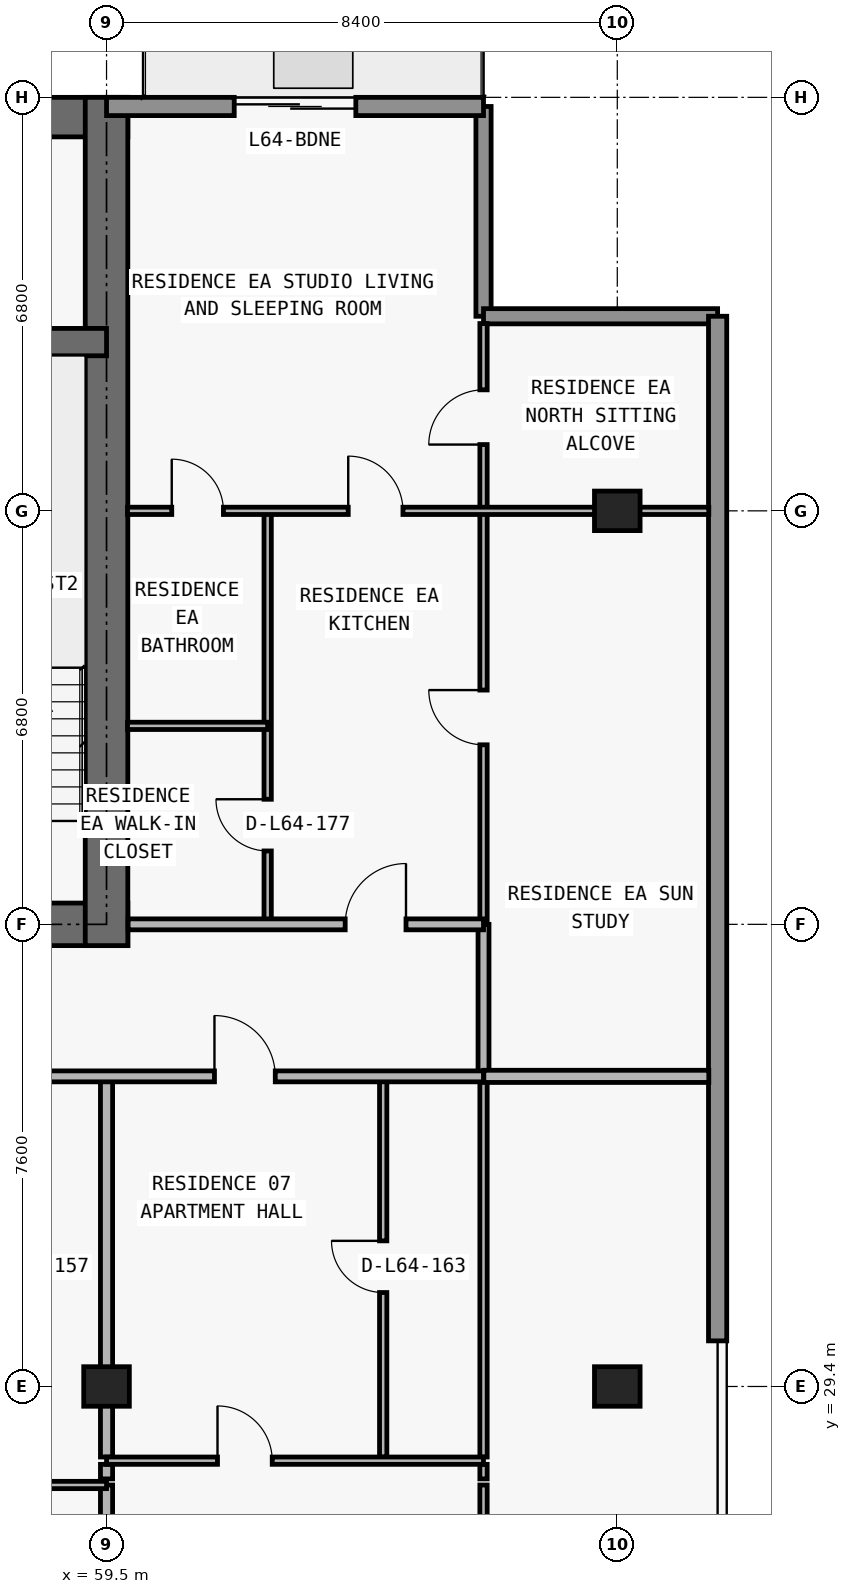
"""IFC4 building model, lengths in metres.
Left out: names, types, materials, properties, quantities, classifications, styles, units other than length and angle.
Written with IfcOpenShell. Run it as: python <this file> out.ifc"""

import sys

from ifc_helpers import new_model, si_unit, direction, frame, frame_2d, origin, origin_2d, place, context, subcontext, project, spatial, rectangle, extrude, element, fill, save


model = new_model("IFC4")
c1 = context("Model", 3, precision=1e-05, world=origin(), true_north=direction((0.0, 1.0)))
c2 = subcontext(c1, "Body", "Model", "MODEL_VIEW")
j1 = project(units=[si_unit("LENGTHUNIT", "METRE"), si_unit("PLANEANGLEUNIT", "RADIAN")], contexts=[c1])
p1 = place(None, origin())
s1 = spatial("IfcSite", under=j1, at=p1, CompositionType="ELEMENT")
p2 = place(p1, origin())
s2 = spatial("IfcBuilding", under=s1, at=p2, CompositionType="ELEMENT")
p3 = place(p2, frame((0.0, 0.0, 229.8)))
s3 = spatial("IfcBuildingStorey", under=s2, at=p3, CompositionType="ELEMENT", Elevation=229.8)
for number, where, z_axis, x_axis in (
    (1, (59.5, 29.4, 0.0), (0.0, 0.0, 1.0), (1.0, 0.0, 0.0)),
    (2, (67.9, 29.4, 0.0), (0.0, 0.0, 1.0), (1.0, 0.0, 0.0)),
    (3, (67.9, 43.8, 0.0), (0.0, 0.0, 1.0), (1.0, 0.0, 0.0)),
):
    element("IfcColumn", number, at=place(p3, frame(where, z_axis=z_axis, x_axis=x_axis)), inside=s3, PredefinedType="COLUMN", context=c2, shape_type="SweptSolid", body=[
        extrude(rectangle(XDim=0.75, YDim=0.65, at=origin_2d()), origin(), (0.0, 0.0, 1.0), 3.05),
    ])
p4 = place(p3, frame((17.95, 37.0, 0.0), z_axis=(0.0, 0.0, 1.0), x_axis=(1.0, 0.0, 0.0)))
e4 = element("IfcWall", 4, at=p4, inside=s3, PredefinedType="SHEAR", context=c2, shape_type="SweptSolid", body=[
    extrude(rectangle(XDim=41.9, YDim=0.7, at=frame_2d((20.95, 0.0))), origin(), (0.0, 0.0, 1.0), 3.05),
])
p5 = place(p4, frame((14.35, 0.0, 0.0)))
e5 = element("IfcOpeningElement", 5, at=p5, cuts=e4, PredefinedType="OPENING", context=c2, shape_type="SweptSolid", body=[
    extrude(rectangle(XDim=1.1, YDim=2.15, at=frame_2d((0.55, 1.075))), frame((0.0, 0.36, 0.0), z_axis=(0.0, -1.0, 0.0), x_axis=(1.0, 0.0, 0.0)), (0.0, 0.0, 1.0), 0.72),
])
p6 = place(p4, frame((6.2, 0.0, 0.0)))
e6 = element("IfcOpeningElement", 6, at=p6, cuts=e4, PredefinedType="OPENING", context=c2, shape_type="SweptSolid", body=[
    extrude(rectangle(XDim=1.05, YDim=2.15, at=frame_2d((0.525, 1.075))), frame((0.0, 0.36, 0.0), z_axis=(0.0, -1.0, 0.0), x_axis=(1.0, 0.0, 0.0)), (0.0, 0.0, 1.0), 0.72),
])
p7 = place(p4, frame((34.7, 0.0, 0.0)))
e7 = element("IfcOpeningElement", 7, at=p7, cuts=e4, PredefinedType="OPENING", context=c2, shape_type="SweptSolid", body=[
    extrude(rectangle(XDim=1.05, YDim=2.15, at=frame_2d((0.525, 1.075))), frame((0.0, 0.36, 0.0), z_axis=(0.0, -1.0, 0.0), x_axis=(1.0, 0.0, 0.0)), (0.0, 0.0, 1.0), 0.72),
])
p8 = place(p4, frame((10.812, 0.0, 0.0)))
e8 = element("IfcOpeningElement", 8, at=p8, cuts=e4, PredefinedType="OPENING", context=c2, shape_type="SweptSolid", body=[
    extrude(rectangle(XDim=1.05, YDim=2.15, at=frame_2d((0.525, 1.075))), frame((0.0, 0.36, 0.0), z_axis=(0.0, -1.0, 0.0), x_axis=(1.0, 0.0, 0.0)), (0.0, 0.0, 1.0), 0.72),
])
p9 = place(p4, frame((24.05, 0.0, 0.0)))
e9 = element("IfcOpeningElement", 9, at=p9, cuts=e4, PredefinedType="OPENING", context=c2, shape_type="SweptSolid", body=[
    extrude(rectangle(XDim=1.05, YDim=2.15, at=frame_2d((0.525, 1.075))), frame((0.0, 0.36, 0.0), z_axis=(0.0, -1.0, 0.0), x_axis=(1.0, 0.0, 0.0)), (0.0, 0.0, 1.0), 0.72),
])
p10 = place(p3, frame((17.95, 50.275, 0.0), z_axis=(0.0, 0.0, 1.0), x_axis=(1.0, 0.0, 0.0)))
e10 = element("IfcWall", 10, at=p10, inside=s3, PredefinedType="SHEAR", context=c2, shape_type="SweptSolid", body=[
    extrude(rectangle(XDim=41.9, YDim=0.65, at=frame_2d((20.95, 0.0))), origin(), (0.0, 0.0, 1.0), 3.05),
])
p11 = place(p3, frame((59.5, 36.65, 0.0), z_axis=(0.0, 0.0, 1.0), x_axis=(0.0, 1.0, 0.0)))
e11 = element("IfcWall", 11, at=p11, inside=s3, PredefinedType="SHEAR", context=c2, shape_type="SweptSolid", body=[
    extrude(rectangle(XDim=13.95, YDim=0.7, at=frame_2d((6.975, 0.0))), origin(), (0.0, 0.0, 1.0), 3.05),
])
p12 = place(p3, frame((18.3, 46.575, 0.0), z_axis=(0.0, 0.0, 1.0), x_axis=(1.0, 0.0, 0.0)))
e12 = element("IfcWall", 12, at=p12, inside=s3, PredefinedType="SHEAR", context=c2, shape_type="SweptSolid", body=[
    extrude(rectangle(XDim=41.2, YDim=0.45, at=frame_2d((20.6, 0.0))), origin(), (0.0, 0.0, 1.0), 3.05),
])
p13 = place(p12, frame((7.575, 0.0, 0.0)))
e13 = element("IfcOpeningElement", 13, at=p13, cuts=e12, PredefinedType="OPENING", context=c2, shape_type="SweptSolid", body=[
    extrude(rectangle(XDim=1.05, YDim=2.15, at=frame_2d((0.525, 1.075))), frame((0.0, 0.235, 0.0), z_axis=(0.0, -1.0, 0.0), x_axis=(1.0, 0.0, 0.0)), (0.0, 0.0, 1.0), 0.47),
])
p14 = place(p12, frame((32.625, 0.0, 0.0)))
e14 = element("IfcOpeningElement", 14, at=p14, cuts=e12, PredefinedType="OPENING", context=c2, shape_type="SweptSolid", body=[
    extrude(rectangle(XDim=1.05, YDim=2.15, at=frame_2d((0.525, 1.075))), frame((0.0, 0.235, 0.0), z_axis=(0.0, -1.0, 0.0), x_axis=(1.0, 0.0, 0.0)), (0.0, 0.0, 1.0), 0.47),
])
p15 = place(p3, frame((65.7, 50.45, 0.0), z_axis=(0.0, 0.0, 1.0), x_axis=(0.0, -1.0, 0.0)))
e15 = element("IfcWall", 15, at=p15, inside=s3, PredefinedType="ELEMENTEDWALL", context=c2, shape_type="SweptSolid", body=[
    extrude(rectangle(XDim=3.45, YDim=0.25, at=frame_2d((1.725, 0.0))), origin(), (0.0, 0.0, 1.0), 3.05),
])
p16 = place(p3, frame((65.7, 47.0, 0.0), z_axis=(0.0, 0.0, 1.0), x_axis=(1.0, 0.0, 0.0)))
e16 = element("IfcWall", 16, at=p16, inside=s3, PredefinedType="ELEMENTEDWALL", context=c2, shape_type="SweptSolid", body=[
    extrude(rectangle(XDim=3.85, YDim=0.25, at=frame_2d((1.925, 0.0))), origin(), (0.0, 0.0, 1.0), 3.05),
])
p17 = place(p3, frame((69.55, 47.0, 0.0), z_axis=(0.0, 0.0, 1.0), x_axis=(0.0, -1.0, 0.0)))
e17 = element("IfcWall", 17, at=p17, inside=s3, PredefinedType="STANDARD", context=c2, shape_type="SweptSolid", body=[
    extrude(rectangle(XDim=16.85, YDim=0.3, at=frame_2d((8.425, 0.0))), origin(), (0.0, 0.0, 1.0), 3.05),
])
p18 = place(p3, frame((59.5, 50.45, 0.0), z_axis=(0.0, 0.0, 1.0), x_axis=(1.0, 0.0, 0.0)))
e18 = element("IfcWall", 18, at=p18, inside=s3, PredefinedType="STANDARD", context=c2, shape_type="SweptSolid", body=[
    extrude(rectangle(XDim=6.2, YDim=0.3, at=frame_2d((3.1, 0.0))), origin(), (0.0, 0.0, 1.0), 3.05),
])
p19 = place(p18, frame((2.1, 0.0, 0.0)))
e19 = element("IfcOpeningElement", 19, at=p19, cuts=e18, PredefinedType="OPENING", context=c2, shape_type="SweptSolid", body=[
    extrude(rectangle(XDim=2.0, YDim=2.3, at=frame_2d((1.0, 1.15))), frame((0.0, 0.16, 0.0), z_axis=(0.0, -1.0, 0.0), x_axis=(1.0, 0.0, 0.0)), (0.0, 0.0, 1.0), 0.32),
])
p20 = place(p3, frame((59.5, 23.09, 0.0), z_axis=(0.0, 0.0, 1.0), x_axis=(0.0, 1.0, 0.0)))
e20 = element("IfcWall", 20, at=p20, inside=s3, PredefinedType="PARTITIONING", context=c2, shape_type="SweptSolid", body=[
    extrude(rectangle(XDim=4.69, YDim=0.2, at=frame_2d((2.345, 0.0))), origin(), (0.0, 0.0, 1.0), 2.263),
])
p21 = place(p3, frame((59.5, 27.88, 0.0), z_axis=(0.0, 0.0, 1.0), x_axis=(0.0, 1.0, 0.0)))
e21 = element("IfcWall", 21, at=p21, inside=s3, PredefinedType="PARTITIONING", context=c2, shape_type="SweptSolid", body=[
    extrude(rectangle(XDim=0.24, YDim=0.2, at=frame_2d((0.12, 0.0))), origin(), (0.0, 0.0, 1.0), 2.263),
])
p22 = place(p3, frame((59.5, 28.24, 0.0), z_axis=(0.0, 0.0, 1.0), x_axis=(0.0, 1.0, 0.0)))
e22 = element("IfcWall", 22, at=p22, inside=s3, PredefinedType="PARTITIONING", context=c2, shape_type="SweptSolid", body=[
    extrude(rectangle(XDim=6.26, YDim=0.2, at=frame_2d((3.13, 0.0))), origin(), (0.0, 0.0, 1.0), 2.263),
])
p23 = place(p3, frame((62.15, 37.0, 0.0), z_axis=(0.0, 0.0, 1.0), x_axis=(0.0, 1.0, 0.0)))
e23 = element("IfcWall", 23, at=p23, inside=s3, PredefinedType="PARTITIONING", context=c2, shape_type="SweptSolid", body=[
    extrude(rectangle(XDim=6.8, YDim=0.12, at=frame_2d((3.4, 0.0))), origin(), (0.0, 0.0, 1.0), 2.679),
])
p24 = place(p23, frame((1.207, 0.0, 0.0)))
e24 = element("IfcOpeningElement", 24, at=p24, cuts=e23, PredefinedType="OPENING", context=c2, shape_type="SweptSolid", body=[
    extrude(rectangle(XDim=0.85, YDim=2.1, at=frame_2d((0.425, 1.05))), frame((0.0, 0.07, 0.0), z_axis=(0.0, -1.0, 0.0), x_axis=(1.0, 0.0, 0.0)), (0.0, 0.0, 1.0), 0.14),
])
p25 = place(p3, frame((64.05, 28.24, 0.0), z_axis=(0.0, 0.0, 1.0), x_axis=(0.0, 1.0, 0.0)))
e25 = element("IfcWall", 25, at=p25, inside=s3, PredefinedType="PARTITIONING", context=c2, shape_type="SweptSolid", body=[
    extrude(rectangle(XDim=6.26, YDim=0.12, at=frame_2d((3.13, 0.0))), origin(), (0.0, 0.0, 1.0), 3.05),
])
p26 = place(p25, frame((2.705, 0.0, 0.0)))
e26 = element("IfcOpeningElement", 26, at=p26, cuts=e25, PredefinedType="OPENING", context=c2, shape_type="SweptSolid", body=[
    extrude(rectangle(XDim=0.85, YDim=2.1, at=frame_2d((0.425, 1.05))), frame((0.0, 0.07, 0.0), z_axis=(0.0, -1.0, 0.0), x_axis=(1.0, 0.0, 0.0)), (0.0, 0.0, 1.0), 0.14),
])
p27 = place(p3, frame((65.7, 23.09, 0.0), z_axis=(0.0, 0.0, 1.0), x_axis=(0.0, 1.0, 0.0)))
e27 = element("IfcWall", 27, at=p27, inside=s3, PredefinedType="PARTITIONING", context=c2, shape_type="SweptSolid", body=[
    extrude(rectangle(XDim=4.69, YDim=0.12, at=frame_2d((2.345, 0.0))), origin(), (0.0, 0.0, 1.0), 3.05),
])
p28 = place(p27, frame((1.895, 0.0, 0.0)))
e28 = element("IfcOpeningElement", 28, at=p28, cuts=e27, PredefinedType="OPENING", context=c2, shape_type="SweptSolid", body=[
    extrude(rectangle(XDim=0.9, YDim=2.15, at=frame_2d((0.45, 1.075))), frame((0.0, 0.07, 0.0), z_axis=(0.0, -1.0, 0.0), x_axis=(1.0, 0.0, 0.0)), (0.0, 0.0, 1.0), 0.14),
])
p29 = place(p3, frame((65.7, 27.88, 0.0), z_axis=(0.0, 0.0, 1.0), x_axis=(0.0, 1.0, 0.0)))
e29 = element("IfcWall", 29, at=p29, inside=s3, PredefinedType="PARTITIONING", context=c2, shape_type="SweptSolid", body=[
    extrude(rectangle(XDim=0.24, YDim=0.12, at=frame_2d((0.12, 0.0))), origin(), (0.0, 0.0, 1.0), 3.05),
])
p30 = place(p3, frame((65.7, 28.24, 0.0), z_axis=(0.0, 0.0, 1.0), x_axis=(0.0, 1.0, 0.0)))
e30 = element("IfcWall", 30, at=p30, inside=s3, PredefinedType="PARTITIONING", context=c2, shape_type="SweptSolid", body=[
    extrude(rectangle(XDim=6.26, YDim=0.12, at=frame_2d((3.13, 0.0))), origin(), (0.0, 0.0, 1.0), 3.05),
])
p31 = place(p3, frame((65.7, 34.505, 0.0), z_axis=(0.0, 0.0, 1.0), x_axis=(0.0, 1.0, 0.0)))
e31 = element("IfcWall", 31, at=p31, inside=s3, PredefinedType="PARTITIONING", context=c2, shape_type="SweptSolid", body=[
    extrude(rectangle(XDim=2.495, YDim=0.18, at=frame_2d((1.248, 0.0))), origin(), (0.0, 0.0, 1.0), 3.05),
])
p32 = place(p3, frame((65.7, 37.005, 0.0), z_axis=(0.0, 0.0, 1.0), x_axis=(0.0, 1.0, 0.0)))
e32 = element("IfcWall", 32, at=p32, inside=s3, PredefinedType="PARTITIONING", context=c2, shape_type="SweptSolid", body=[
    extrude(rectangle(XDim=9.875, YDim=0.12, at=frame_2d((4.938, 0.0))), origin(), (0.0, 0.0, 1.0), 3.05),
])
p33 = place(p32, frame((2.948, 0.0, 0.0)))
e33 = element("IfcOpeningElement", 33, at=p33, cuts=e32, PredefinedType="OPENING", context=c2, shape_type="SweptSolid", body=[
    extrude(rectangle(XDim=0.9, YDim=2.15, at=frame_2d((0.45, 1.075))), frame((0.0, 0.07, 0.0), z_axis=(0.0, -1.0, 0.0), x_axis=(1.0, 0.0, 0.0)), (0.0, 0.0, 1.0), 0.14),
])
p34 = place(p32, frame((7.885, 0.0, 0.0)))
e34 = element("IfcOpeningElement", 34, at=p34, cuts=e32, PredefinedType="OPENING", context=c2, shape_type="SweptSolid", body=[
    extrude(rectangle(XDim=0.9, YDim=2.15, at=frame_2d((0.45, 1.075))), frame((0.0, 0.07, 0.0), z_axis=(0.0, -1.0, 0.0), x_axis=(1.0, 0.0, 0.0)), (0.0, 0.0, 1.0), 0.14),
])
p35 = place(p3, frame((51.32, 27.78, 0.0), z_axis=(0.0, 0.0, 1.0), x_axis=(1.0, 0.0, 0.0)))
e35 = element("IfcWall", 35, at=p35, inside=s3, PredefinedType="PARTITIONING", context=c2, shape_type="SweptSolid", body=[
    extrude(rectangle(XDim=8.18, YDim=0.12, at=frame_2d((4.09, 0.0))), origin(), (0.0, 0.0, 1.0), 3.05),
])
p36 = place(p35, frame((1.583, 0.0, 0.0)))
e36 = element("IfcOpeningElement", 36, at=p36, cuts=e35, PredefinedType="OPENING", context=c2, shape_type="SweptSolid", body=[
    extrude(rectangle(XDim=0.9, YDim=2.15, at=frame_2d((0.45, 1.075))), frame((0.0, 0.07, 0.0), z_axis=(0.0, -1.0, 0.0), x_axis=(1.0, 0.0, 0.0)), (0.0, 0.0, 1.0), 0.14),
])
p37 = place(p3, frame((59.5, 28.18, 0.0), z_axis=(0.0, 0.0, 1.0), x_axis=(1.0, 0.0, 0.0)))
e37 = element("IfcWall", 37, at=p37, inside=s3, PredefinedType="PARTITIONING", context=c2, shape_type="SweptSolid", body=[
    extrude(rectangle(XDim=6.2, YDim=0.12, at=frame_2d((3.1, 0.0))), origin(), (0.0, 0.0, 1.0), 3.05),
])
p38 = place(p37, frame((1.825, 0.0, 0.0)))
e38 = element("IfcOpeningElement", 38, at=p38, cuts=e37, PredefinedType="OPENING", context=c2, shape_type="SweptSolid", body=[
    extrude(rectangle(XDim=0.9, YDim=2.15, at=frame_2d((0.45, 1.075))), frame((0.0, 0.07, 0.0), z_axis=(0.0, -1.0, 0.0), x_axis=(1.0, 0.0, 0.0)), (0.0, 0.0, 1.0), 0.14),
])
p39 = place(p3, frame((39.28, 34.5, 0.0), z_axis=(0.0, 0.0, 1.0), x_axis=(1.0, 0.0, 0.0)))
e39 = element("IfcWall", 39, at=p39, inside=s3, PredefinedType="PARTITIONING", context=c2, shape_type="SweptSolid", body=[
    extrude(rectangle(XDim=26.42, YDim=0.18, at=frame_2d((13.21, 0.0))), origin(), (0.0, 0.0, 1.0), 3.05),
])
p40 = place(p39, frame((6.295, 0.0, 0.0)))
e40 = element("IfcOpeningElement", 40, at=p40, cuts=e39, PredefinedType="OPENING", context=c2, shape_type="SweptSolid", body=[
    extrude(rectangle(XDim=1.0, YDim=2.2, at=frame_2d((0.5, 1.1))), frame((0.0, 0.1, 0.0), z_axis=(0.0, -1.0, 0.0), x_axis=(1.0, 0.0, 0.0)), (0.0, 0.0, 1.0), 0.2),
])
p41 = place(p39, frame((14.695, 0.0, 0.0)))
e41 = element("IfcOpeningElement", 41, at=p41, cuts=e39, PredefinedType="OPENING", context=c2, shape_type="SweptSolid", body=[
    extrude(rectangle(XDim=1.0, YDim=2.2, at=frame_2d((0.5, 1.1))), frame((0.0, 0.1, 0.0), z_axis=(0.0, -1.0, 0.0), x_axis=(1.0, 0.0, 0.0)), (0.0, 0.0, 1.0), 0.2),
])
p42 = place(p39, frame((21.995, 0.0, 0.0)))
e42 = element("IfcOpeningElement", 42, at=p42, cuts=e39, PredefinedType="OPENING", context=c2, shape_type="SweptSolid", body=[
    extrude(rectangle(XDim=1.0, YDim=2.2, at=frame_2d((0.5, 1.1))), frame((0.0, 0.1, 0.0), z_axis=(0.0, -1.0, 0.0), x_axis=(1.0, 0.0, 0.0)), (0.0, 0.0, 1.0), 0.2),
])
p43 = place(p3, frame((65.705, 34.5, 0.0), z_axis=(0.0, 0.0, 1.0), x_axis=(1.0, 0.0, 0.0)))
e43 = element("IfcWall", 43, at=p43, inside=s3, PredefinedType="PARTITIONING", context=c2, shape_type="SweptSolid", body=[
    extrude(rectangle(XDim=3.7, YDim=0.2, at=frame_2d((1.85, 0.0))), origin(), (0.0, 0.0, 1.0), 3.05),
])
p44 = place(p3, frame((59.855, 37.0, 0.0), z_axis=(0.0, 0.0, 1.0), x_axis=(1.0, 0.0, 0.0)))
e44 = element("IfcWall", 44, at=p44, inside=s3, PredefinedType="PARTITIONING", context=c2, shape_type="SweptSolid", body=[
    extrude(rectangle(XDim=5.845, YDim=0.18, at=frame_2d((2.922, 0.0))), origin(), (0.0, 0.0, 1.0), 3.05),
])
p45 = place(p44, frame((3.57, 0.0, 0.0)))
e45 = element("IfcOpeningElement", 45, at=p45, cuts=e44, PredefinedType="OPENING", context=c2, shape_type="SweptSolid", body=[
    extrude(rectangle(XDim=1.0, YDim=2.2, at=frame_2d((0.5, 1.1))), frame((0.0, 0.1, 0.0), z_axis=(0.0, -1.0, 0.0), x_axis=(1.0, 0.0, 0.0)), (0.0, 0.0, 1.0), 0.2),
])
p46 = place(p3, frame((59.845, 40.264, 0.0), z_axis=(0.0, 0.0, 1.0), x_axis=(1.0, 0.0, 0.0)))
e46 = element("IfcWall", 46, at=p46, inside=s3, PredefinedType="PARTITIONING", context=c2, shape_type="SweptSolid", body=[
    extrude(rectangle(XDim=2.305, YDim=0.12, at=frame_2d((1.152, 0.0))), origin(), (0.0, 0.0, 1.0), 3.05),
])
p47 = place(p3, frame((59.845, 43.8, 0.0), z_axis=(0.0, 0.0, 1.0), x_axis=(1.0, 0.0, 0.0)))
e47 = element("IfcWall", 47, at=p47, inside=s3, PredefinedType="PARTITIONING", context=c2, shape_type="SweptSolid", body=[
    extrude(rectangle(XDim=9.56, YDim=0.12, at=frame_2d((4.78, 0.0))), origin(), (0.0, 0.0, 1.0), 2.418),
])
p48 = place(p47, frame((3.63, 0.0, 0.0)))
e48 = element("IfcOpeningElement", 48, at=p48, cuts=e47, PredefinedType="OPENING", context=c2, shape_type="SweptSolid", body=[
    extrude(rectangle(XDim=0.9, YDim=2.15, at=frame_2d((0.45, 1.075))), frame((0.0, 0.07, 0.0), z_axis=(0.0, -1.0, 0.0), x_axis=(1.0, 0.0, 0.0)), (0.0, 0.0, 1.0), 0.14),
])
p49 = place(p47, frame((0.728, 0.0, 0.0)))
e49 = element("IfcOpeningElement", 49, at=p49, cuts=e47, PredefinedType="OPENING", context=c2, shape_type="SweptSolid", body=[
    extrude(rectangle(XDim=0.85, YDim=2.1, at=frame_2d((0.425, 1.05))), frame((0.0, 0.07, 0.0), z_axis=(0.0, -1.0, 0.0), x_axis=(1.0, 0.0, 0.0)), (0.0, 0.0, 1.0), 0.14),
])
p50 = place(p19, origin())
e50 = element("IfcDoor", 50, at=p50, inside=s3, OperationType="DOUBLE_DOOR_SLIDING", PredefinedType="DOOR", context=c2, shape_type="SweptSolid", body=[
    extrude(rectangle(XDim=2.0, YDim=2.3, at=frame_2d((1.0, 1.15))), frame((0.0, 0.025, 0.0), z_axis=(0.0, -1.0, 0.0), x_axis=(1.0, 0.0, 0.0)), (0.0, 0.0, 1.0), 0.05),
])
fill(e19, e50)
p51 = place(p42, origin())
e51 = element("IfcDoor", 51, at=p51, inside=s3, OperationType="SINGLE_SWING_LEFT", PredefinedType="DOOR", context=c2, shape_type="SweptSolid", body=[
    extrude(rectangle(XDim=1.0, YDim=2.2, at=frame_2d((0.5, 1.1))), frame((0.0, 0.025, 0.0), z_axis=(0.0, -1.0, 0.0), x_axis=(1.0, 0.0, 0.0)), (0.0, 0.0, 1.0), 0.05),
])
fill(e42, e51)
p52 = place(p26, origin())
e52 = element("IfcDoor", 52, at=p52, inside=s3, OperationType="SINGLE_SWING_RIGHT", PredefinedType="DOOR", context=c2, shape_type="SweptSolid", body=[
    extrude(rectangle(XDim=0.85, YDim=2.1, at=frame_2d((0.425, 1.05))), frame((0.0, 0.025, 0.0), z_axis=(0.0, -1.0, 0.0), x_axis=(1.0, 0.0, 0.0)), (0.0, 0.0, 1.0), 0.05),
])
fill(e26, e52)
p53 = place(p38, origin())
e53 = element("IfcDoor", 53, at=p53, inside=s3, OperationType="SINGLE_SWING_LEFT", PredefinedType="DOOR", context=c2, shape_type="SweptSolid", body=[
    extrude(rectangle(XDim=0.9, YDim=2.15, at=frame_2d((0.45, 1.075))), frame((0.0, 0.025, 0.0), z_axis=(0.0, -1.0, 0.0), x_axis=(1.0, 0.0, 0.0)), (0.0, 0.0, 1.0), 0.05),
])
fill(e38, e53)
p54 = place(p45, origin())
e54 = element("IfcDoor", 54, at=p54, inside=s3, OperationType="SINGLE_SWING_RIGHT", PredefinedType="DOOR", context=c2, shape_type="SweptSolid", body=[
    extrude(rectangle(XDim=1.0, YDim=2.2, at=frame_2d((0.5, 1.1))), frame((0.0, 0.025, 0.0), z_axis=(0.0, -1.0, 0.0), x_axis=(1.0, 0.0, 0.0)), (0.0, 0.0, 1.0), 0.05),
])
fill(e45, e54)
p55 = place(p48, origin())
e55 = element("IfcDoor", 55, at=p55, inside=s3, OperationType="SINGLE_SWING_LEFT", PredefinedType="DOOR", context=c2, shape_type="SweptSolid", body=[
    extrude(rectangle(XDim=0.9, YDim=2.15, at=frame_2d((0.45, 1.075))), frame((0.0, 0.025, 0.0), z_axis=(0.0, -1.0, 0.0), x_axis=(1.0, 0.0, 0.0)), (0.0, 0.0, 1.0), 0.05),
])
fill(e48, e55)
p56 = place(p24, origin())
e56 = element("IfcDoor", 56, at=p56, inside=s3, OperationType="SINGLE_SWING_RIGHT", PredefinedType="DOOR", context=c2, shape_type="SweptSolid", body=[
    extrude(rectangle(XDim=0.85, YDim=2.1, at=frame_2d((0.425, 1.05))), frame((0.0, 0.025, 0.0), z_axis=(0.0, -1.0, 0.0), x_axis=(1.0, 0.0, 0.0)), (0.0, 0.0, 1.0), 0.05),
])
fill(e24, e56)
p57 = place(p49, origin())
e57 = element("IfcDoor", 57, at=p57, inside=s3, OperationType="SINGLE_SWING_LEFT", PredefinedType="DOOR", context=c2, shape_type="SweptSolid", body=[
    extrude(rectangle(XDim=0.85, YDim=2.1, at=frame_2d((0.425, 1.05))), frame((0.0, 0.025, 0.0), z_axis=(0.0, -1.0, 0.0), x_axis=(1.0, 0.0, 0.0)), (0.0, 0.0, 1.0), 0.05),
])
fill(e49, e57)
p58 = place(p33, origin())
e58 = element("IfcDoor", 58, at=p58, inside=s3, OperationType="SINGLE_SWING_RIGHT", PredefinedType="DOOR", context=c2, shape_type="SweptSolid", body=[
    extrude(rectangle(XDim=0.9, YDim=2.15, at=frame_2d((0.45, 1.075))), frame((0.0, 0.025, 0.0), z_axis=(0.0, -1.0, 0.0), x_axis=(1.0, 0.0, 0.0)), (0.0, 0.0, 1.0), 0.05),
])
fill(e33, e58)
p59 = place(p34, origin())
e59 = element("IfcDoor", 59, at=p59, inside=s3, OperationType="SINGLE_SWING_LEFT", PredefinedType="DOOR", context=c2, shape_type="SweptSolid", body=[
    extrude(rectangle(XDim=0.9, YDim=2.15, at=frame_2d((0.45, 1.075))), frame((0.0, 0.025, 0.0), z_axis=(0.0, -1.0, 0.0), x_axis=(1.0, 0.0, 0.0)), (0.0, 0.0, 1.0), 0.05),
])
fill(e34, e59)
save(model, sys.argv[1])
